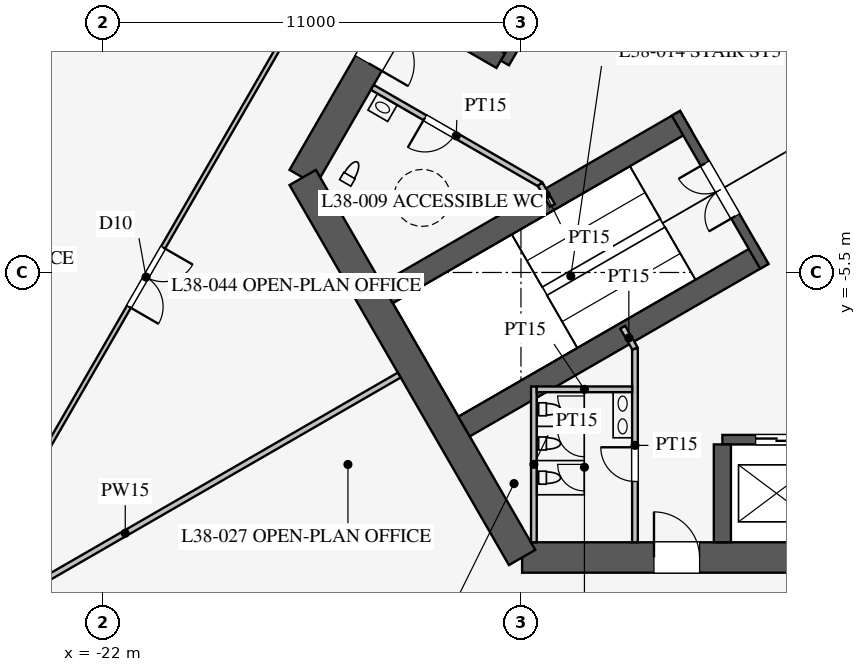
"""IFC4 building model, lengths in metres.
Left out: names, types, materials, properties, quantities, classifications, styles, units other than length and angle.
Written with IfcOpenShell. Run it as: python <this file> out.ifc"""

import sys

from ifc_helpers import new_model, si_unit, direction, frame, frame_2d, origin, place, context, subcontext, project, spatial, rectangle, extrude, element, fill, save


model = new_model("IFC4")
c1 = context("Model", 3, precision=1e-05, world=origin(), true_north=direction((0.0, 1.0)))
c2 = subcontext(c1, "Body", "Model", "MODEL_VIEW")
j1 = project(units=[si_unit("LENGTHUNIT", "METRE"), si_unit("PLANEANGLEUNIT", "RADIAN")], contexts=[c1])
p1 = place(None, origin())
s1 = spatial("IfcSite", under=j1, at=p1, CompositionType="ELEMENT")
p2 = place(p1, origin())
s2 = spatial("IfcBuilding", under=s1, at=p2, CompositionType="ELEMENT")
p3 = place(p2, frame((0.0, 0.0, 166.1)))
s3 = spatial("IfcBuildingStorey", under=s2, at=p3, CompositionType="ELEMENT", Elevation=166.1)
p4 = place(p3, frame((-10.97, -13.0, 0.0), z_axis=(0.0, 0.0, 1.0), x_axis=(1.0, 0.0, 0.0)))
e1 = element("IfcWall", 1, at=p4, inside=s3, PredefinedType="SHEAR", context=c2, shape_type="SweptSolid", body=[
    extrude(rectangle(XDim=21.939, YDim=0.8, at=frame_2d((10.97, 0.0))), origin(), (0.0, 0.0, 1.0), 4.2),
])
p5 = place(p4, frame((17.27, 0.0, 0.0)))
e2 = element("IfcOpeningElement", 2, at=p5, cuts=e1, PredefinedType="OPENING", context=c2, shape_type="SweptSolid", body=[
    extrude(rectangle(XDim=1.2, YDim=2.1, at=frame_2d((0.6, 1.05))), frame((0.0, 0.41, 0.0), z_axis=(0.0, -1.0, 0.0), x_axis=(1.0, 0.0, 0.0)), (0.0, 0.0, 1.0), 0.82),
])
p6 = place(p4, frame((3.47, 0.0, 0.0)))
e3 = element("IfcOpeningElement", 3, at=p6, cuts=e1, PredefinedType="OPENING", context=c2, shape_type="SweptSolid", body=[
    extrude(rectangle(XDim=1.2, YDim=2.1, at=frame_2d((0.6, 1.05))), frame((0.0, 0.41, 0.0), z_axis=(0.0, -1.0, 0.0), x_axis=(1.0, 0.0, 0.0)), (0.0, 0.0, 1.0), 0.82),
])
p7 = place(p3, frame((-5.773, 16.0, 0.0), z_axis=(0.0, 0.0, 1.0), x_axis=(-0.500002442456, -0.866023993627, 0.0)))
e4 = element("IfcWall", 4, at=p7, inside=s3, PredefinedType="SHEAR", context=c2, shape_type="SweptSolid", body=[
    extrude(rectangle(XDim=21.939, YDim=0.8, at=frame_2d((10.97, 0.0))), origin(), (0.0, 0.0, 1.0), 4.2),
])
p8 = place(p7, frame((17.27, 0.0, 0.0)))
e5 = element("IfcOpeningElement", 5, at=p8, cuts=e4, PredefinedType="OPENING", context=c2, shape_type="SweptSolid", body=[
    extrude(rectangle(XDim=1.2, YDim=2.1, at=frame_2d((0.6, 1.05))), frame((0.0, 0.41, 0.0), z_axis=(0.0, -1.0, 0.0), x_axis=(1.0, 0.0, 0.0)), (0.0, 0.0, 1.0), 0.82),
])
p9 = place(p7, frame((3.47, 0.0, 0.0)))
e6 = element("IfcOpeningElement", 6, at=p9, cuts=e4, PredefinedType="OPENING", context=c2, shape_type="SweptSolid", body=[
    extrude(rectangle(XDim=1.2, YDim=2.1, at=frame_2d((0.6, 1.05))), frame((0.0, 0.41, 0.0), z_axis=(0.0, -1.0, 0.0), x_axis=(1.0, 0.0, 0.0)), (0.0, 0.0, 1.0), 0.82),
])
p10 = place(p3, frame((-16.743, -3.0, 0.0), z_axis=(0.0, 0.0, 1.0), x_axis=(0.499995765644, -0.866027848477, 0.0)))
e7 = element("IfcWall", 7, at=p10, inside=s3, PredefinedType="SHEAR", context=c2, shape_type="SweptSolid", body=[
    extrude(rectangle(XDim=11.547, YDim=0.8, at=frame_2d((5.773, 0.0))), origin(), (0.0, 0.0, 1.0), 4.2),
])
p11 = place(p3, frame((-5.7, -9.9, 0.0), z_axis=(0.0, 0.0, 1.0), x_axis=(1.0, 0.0, 0.0)))
e8 = element("IfcWall", 8, at=p11, inside=s3, PredefinedType="SHEAR", context=c2, shape_type="SweptSolid", body=[
    extrude(rectangle(XDim=11.4, YDim=0.25, at=frame_2d((5.7, 0.0))), origin(), (0.0, 0.0, 1.0), 4.2),
])
p12 = place(p11, frame((0.875, 0.0, 0.0)))
e9 = element("IfcOpeningElement", 9, at=p12, cuts=e8, PredefinedType="OPENING", context=c2, shape_type="SweptSolid", body=[
    extrude(rectangle(XDim=1.1, YDim=2.2, at=frame_2d((0.55, 1.1))), frame((0.0, 0.135, 0.0), z_axis=(0.0, -1.0, 0.0), x_axis=(1.0, 0.0, 0.0)), (0.0, 0.0, 1.0), 0.27),
])
p13 = place(p11, frame((3.725, 0.0, 0.0)))
e10 = element("IfcOpeningElement", 10, at=p13, cuts=e8, PredefinedType="OPENING", context=c2, shape_type="SweptSolid", body=[
    extrude(rectangle(XDim=1.1, YDim=2.2, at=frame_2d((0.55, 1.1))), frame((0.0, 0.135, 0.0), z_axis=(0.0, -1.0, 0.0), x_axis=(1.0, 0.0, 0.0)), (0.0, 0.0, 1.0), 0.27),
])
p14 = place(p11, frame((6.575, 0.0, 0.0)))
e11 = element("IfcOpeningElement", 11, at=p14, cuts=e8, PredefinedType="OPENING", context=c2, shape_type="SweptSolid", body=[
    extrude(rectangle(XDim=1.1, YDim=2.2, at=frame_2d((0.55, 1.1))), frame((0.0, 0.135, 0.0), z_axis=(0.0, -1.0, 0.0), x_axis=(1.0, 0.0, 0.0)), (0.0, 0.0, 1.0), 0.27),
])
p15 = place(p11, frame((9.425, 0.0, 0.0)))
e12 = element("IfcOpeningElement", 12, at=p15, cuts=e8, PredefinedType="OPENING", context=c2, shape_type="SweptSolid", body=[
    extrude(rectangle(XDim=1.1, YDim=2.2, at=frame_2d((0.55, 1.1))), frame((0.0, 0.135, 0.0), z_axis=(0.0, -1.0, 0.0), x_axis=(1.0, 0.0, 0.0)), (0.0, 0.0, 1.0), 0.27),
])
p16 = place(p3, frame((-5.7, -10.025, 0.0), z_axis=(0.0, 0.0, 1.0), x_axis=(0.0, -1.0, 0.0)))
e13 = element("IfcWall", 13, at=p16, inside=s3, PredefinedType="SHEAR", context=c2, shape_type="SweptSolid", body=[
    extrude(rectangle(XDim=2.575, YDim=0.45, at=frame_2d((1.288, 0.0))), origin(), (0.0, 0.0, 1.0), 4.2),
])
p17 = place(p3, frame((-5.724, 9.886, 0.0), z_axis=(0.0, 0.0, 1.0), x_axis=(-0.500001763848, -0.866024385424, 0.0)))
e14 = element("IfcWall", 14, at=p17, inside=s3, PredefinedType="SHEAR", context=c2, shape_type="SweptSolid", body=[
    extrude(rectangle(XDim=11.4, YDim=0.25, at=frame_2d((5.7, 0.0))), origin(), (0.0, 0.0, 1.0), 4.2),
])
p18 = place(p17, frame((6.525, 0.0, 0.0)))
e15 = element("IfcOpeningElement", 15, at=p18, cuts=e14, PredefinedType="OPENING", context=c2, shape_type="SweptSolid", body=[
    extrude(rectangle(XDim=1.2, YDim=2.2, at=frame_2d((0.6, 1.1))), frame((0.0, 0.135, 0.0), z_axis=(0.0, -1.0, 0.0), x_axis=(1.0, 0.0, 0.0)), (0.0, 0.0, 1.0), 0.27),
])
p19 = place(p17, frame((9.375, 0.0, 0.0)))
e16 = element("IfcOpeningElement", 16, at=p19, cuts=e14, PredefinedType="OPENING", context=c2, shape_type="SweptSolid", body=[
    extrude(rectangle(XDim=1.2, YDim=2.2, at=frame_2d((0.6, 1.1))), frame((0.0, 0.135, 0.0), z_axis=(0.0, -1.0, 0.0), x_axis=(1.0, 0.0, 0.0)), (0.0, 0.0, 1.0), 0.27),
])
p20 = place(p3, frame((-11.532, 0.076, 0.0), z_axis=(0.0, 0.0, 1.0), x_axis=(-0.866005588531, 0.500034319456, 0.0)))
e17 = element("IfcWall", 17, at=p20, inside=s3, PredefinedType="SHEAR", context=c2, shape_type="SweptSolid", body=[
    extrude(rectangle(XDim=2.575, YDim=0.45, at=frame_2d((1.288, 0.0))), origin(), (0.0, 0.0, 1.0), 4.2),
])
for number, where, z_axis, x_axis in (
    (18, (-6.663, -1.509, 0.0), (0.0, 0.0, 1.0), (-0.866, -0.5, 0.0)),
    (19, (-4.638, -5.016, 0.0), (0.0, 0.0, 1.0), (-0.866, -0.5, 0.0)),
):
    element("IfcWall", number, at=place(p3, frame(where, z_axis=z_axis, x_axis=x_axis)), inside=s3, PredefinedType="SHEAR", context=c2, shape_type="SweptSolid", body=[
        extrude(rectangle(XDim=9.075, YDim=0.6, at=frame_2d((4.538, 0.0))), origin(), (0.0, 0.0, 1.0), 4.2),
    ])
p21 = place(p3, frame((-6.922, -1.312, 0.0), z_axis=(0.0, 0.0, 1.0), x_axis=(0.499984536904, -0.866034331223, 0.0)))
e20 = element("IfcWall", 20, at=p21, inside=s3, PredefinedType="SHEAR", context=c2, shape_type="SweptSolid", body=[
    extrude(rectangle(XDim=4.65, YDim=0.25, at=frame_2d((2.325, 0.0))), origin(), (0.0, 0.0, 1.0), 4.2),
])
p22 = place(p21, frame((1.525, 0.0, 0.0)))
e21 = element("IfcOpeningElement", 21, at=p22, cuts=e20, PredefinedType="OPENING", context=c2, shape_type="SweptSolid", body=[
    extrude(rectangle(XDim=1.6, YDim=2.1, at=frame_2d((0.8, 1.05))), frame((0.0, 0.135, 0.0), z_axis=(0.0, -1.0, 0.0), x_axis=(1.0, 0.0, 0.0)), (0.0, 0.0, 1.0), 0.27),
])
p23 = place(p3, frame((-8.0, -7.5, 0.0), z_axis=(0.0, 0.0, 1.0), x_axis=(0.0, -1.0, 0.0)))
e22 = element("IfcWall", 22, at=p23, inside=s3, PredefinedType="PARTITIONING", context=c2, shape_type="SweptSolid", body=[
    extrude(rectangle(XDim=5.1, YDim=0.15, at=frame_2d((2.55, 0.0))), origin(), (0.0, 0.0, 1.0), 4.0),
])
p24 = place(p23, frame((2.6, 0.0, 0.0)))
e23 = element("IfcOpeningElement", 23, at=p24, cuts=e22, PredefinedType="OPENING", context=c2, shape_type="SweptSolid", body=[
    extrude(rectangle(XDim=0.9, YDim=2.1, at=frame_2d((0.45, 1.05))), frame((0.0, 0.085, 0.0), z_axis=(0.0, -1.0, 0.0), x_axis=(1.0, 0.0, 0.0)), (0.0, 0.0, 1.0), 0.17),
])
p25 = place(p3, frame((-10.495, -3.178, 0.0), z_axis=(0.0, 0.0, 1.0), x_axis=(-0.86602216432, 0.500005610874, 0.0)))
e24 = element("IfcWall", 24, at=p25, inside=s3, PredefinedType="PARTITIONING", context=c2, shape_type="SweptSolid", body=[
    extrude(rectangle(XDim=5.1, YDim=0.15, at=frame_2d((2.55, 0.0))), origin(), (0.0, 0.0, 1.0), 4.0),
])
p26 = place(p25, frame((2.6, 0.0, 0.0)))
e25 = element("IfcOpeningElement", 25, at=p26, cuts=e24, PredefinedType="OPENING", context=c2, shape_type="SweptSolid", body=[
    extrude(rectangle(XDim=0.9, YDim=2.1, at=frame_2d((0.45, 1.05))), frame((0.0, 0.085, 0.0), z_axis=(0.0, -1.0, 0.0), x_axis=(1.0, 0.0, 0.0)), (0.0, 0.0, 1.0), 0.17),
])
for number, where, z_axis, x_axis in (
    (26, (-10.495, -3.178, 0.0), (0.0, 0.0, 1.0), (0.5, -0.866, 0.0)),
    (27, (-8.0, -7.5, 0.0), (0.0, 0.0, 1.0), (-0.5, 0.866, 0.0)),
):
    element("IfcWall", number, at=place(p3, frame(where, z_axis=z_axis, x_axis=x_axis)), inside=s3, PredefinedType="PARTITIONING", context=c2, shape_type="SweptSolid", body=[
        extrude(rectangle(XDim=0.645, YDim=0.15, at=frame_2d((0.323, 0.0))), origin(), (0.0, 0.0, 1.0), 4.0),
    ])
p27 = place(p3, frame((-10.66, -8.5, 0.0), z_axis=(0.0, 0.0, 1.0), x_axis=(0.0, -1.0, 0.0)))
e28 = element("IfcWall", 28, at=p27, inside=s3, PredefinedType="PARTITIONING", context=c2, shape_type="SweptSolid", body=[
    extrude(rectangle(XDim=4.1, YDim=0.15, at=frame_2d((2.05, 0.0))), origin(), (0.0, 0.0, 1.0), 4.0),
])
p28 = place(p3, frame((-8.075, -8.575, 0.0), z_axis=(0.0, 0.0, 1.0), x_axis=(-1.0, 0.0, 0.0)))
e29 = element("IfcWall", 29, at=p28, inside=s3, PredefinedType="PARTITIONING", context=c2, shape_type="SweptSolid", body=[
    extrude(rectangle(XDim=2.51, YDim=0.15, at=frame_2d((1.255, 0.0))), origin(), (0.0, 0.0, 1.0), 4.0),
])
p29 = place(p3, frame((-14.203, -8.2, 0.0), z_axis=(0.0, 0.0, 1.0), x_axis=(-0.866024668836, -0.500001272966, 0.0)))
e30 = element("IfcWall", 30, at=p29, inside=s3, PredefinedType="PARTITIONING", context=c2, shape_type="SweptSolid", body=[
    extrude(rectangle(XDim=16.65, YDim=0.15, at=frame_2d((8.325, 0.0))), origin(), (0.0, 0.0, 1.0), 2.3),
])
p30 = place(p3, frame((-0.016, 30.491, 0.0), z_axis=(0.0, 0.0, 1.0), x_axis=(-0.50000091641, -0.866024874695, 0.0)))
e31 = element("IfcWall", 31, at=p30, inside=s3, PredefinedType="PARTITIONING", context=c2, shape_type="SweptSolid", body=[
    extrude(rectangle(XDim=52.796, YDim=0.12, at=frame_2d((26.398, 0.0))), origin(), (0.0, 0.0, 1.0), 2.9),
])
p31 = place(p30, frame((10.2, 0.0, 0.15)))
e32 = element("IfcOpeningElement", 32, at=p31, cuts=e31, PredefinedType="OPENING", context=c2, shape_type="SweptSolid", body=[
    extrude(rectangle(XDim=1.8, YDim=2.1, at=frame_2d((0.9, 1.05))), frame((0.0, 0.07, 0.0), z_axis=(0.0, -1.0, 0.0), x_axis=(1.0, 0.0, 0.0)), (0.0, 0.0, 1.0), 0.14),
])
p32 = place(p30, frame((40.8, 0.0, 0.15)))
e33 = element("IfcOpeningElement", 33, at=p32, cuts=e31, PredefinedType="OPENING", context=c2, shape_type="SweptSolid", body=[
    extrude(rectangle(XDim=1.8, YDim=2.1, at=frame_2d((0.9, 1.05))), frame((0.0, 0.07, 0.0), z_axis=(0.0, -1.0, 0.0), x_axis=(1.0, 0.0, 0.0)), (0.0, 0.0, 1.0), 0.14),
])
p33 = place(p24, frame((0.9, 0.0, 0.0), z_axis=(0.0, 0.0, 1.0), x_axis=(-1.0, 0.0, 0.0)))
e34 = element("IfcDoor", 34, at=p33, inside=s3, OperationType="SINGLE_SWING_RIGHT", PredefinedType="DOOR", context=c2, shape_type="SweptSolid", body=[
    extrude(rectangle(XDim=0.9, YDim=2.1, at=frame_2d((0.45, 1.05))), frame((0.0, 0.025, 0.0), z_axis=(0.0, -1.0, 0.0), x_axis=(1.0, 0.0, 0.0)), (0.0, 0.0, 1.0), 0.05),
])
fill(e23, e34)
p34 = place(p26, origin())
e35 = element("IfcDoor", 35, at=p34, inside=s3, OperationType="SINGLE_SWING_RIGHT", PredefinedType="DOOR", context=c2, shape_type="SweptSolid", body=[
    extrude(rectangle(XDim=0.9, YDim=2.1, at=frame_2d((0.45, 1.05))), frame((0.0, 0.025, 0.0), z_axis=(0.0, -1.0, 0.0), x_axis=(1.0, 0.0, 0.0)), (0.0, 0.0, 1.0), 0.05),
])
fill(e25, e35)
p35 = place(p22, frame((1.6, 0.0, 0.0), z_axis=(0.0, 0.0, 1.0), x_axis=(-1.0, 0.0, 0.0)))
e36 = element("IfcDoor", 36, at=p35, inside=s3, OperationType="DOUBLE_DOOR_SINGLE_SWING", PredefinedType="DOOR", context=c2, shape_type="SweptSolid", body=[
    extrude(rectangle(XDim=1.6, YDim=2.1, at=frame_2d((0.8, 1.05))), frame((0.0, 0.025, 0.0), z_axis=(0.0, -1.0, 0.0), x_axis=(1.0, 0.0, 0.0)), (0.0, 0.0, 1.0), 0.05),
])
fill(e21, e36)
p36 = place(p6, origin())
e37 = element("IfcDoor", 37, at=p36, inside=s3, OperationType="SINGLE_SWING_LEFT", PredefinedType="DOOR", context=c2, shape_type="SweptSolid", body=[
    extrude(rectangle(XDim=1.2, YDim=2.1, at=frame_2d((0.6, 1.05))), frame((0.0, 0.025, 0.0), z_axis=(0.0, -1.0, 0.0), x_axis=(1.0, 0.0, 0.0)), (0.0, 0.0, 1.0), 0.05),
])
fill(e3, e37)
p37 = place(p8, origin())
e38 = element("IfcDoor", 38, at=p37, inside=s3, OperationType="SINGLE_SWING_RIGHT", PredefinedType="DOOR", context=c2, shape_type="SweptSolid", body=[
    extrude(rectangle(XDim=1.2, YDim=2.1, at=frame_2d((0.6, 1.05))), frame((0.0, 0.025, 0.0), z_axis=(0.0, -1.0, 0.0), x_axis=(1.0, 0.0, 0.0)), (0.0, 0.0, 1.0), 0.05),
])
fill(e5, e38)
p38 = place(p32, origin())
e39 = element("IfcDoor", 39, at=p38, inside=s3, OperationType="DOUBLE_DOOR_SINGLE_SWING", PredefinedType="DOOR", context=c2, shape_type="SweptSolid", body=[
    extrude(rectangle(XDim=1.8, YDim=2.1, at=frame_2d((0.9, 1.05))), frame((0.0, 0.025, 0.0), z_axis=(0.0, -1.0, 0.0), x_axis=(1.0, 0.0, 0.0)), (0.0, 0.0, 1.0), 0.05),
])
fill(e33, e39)
p39 = place(p12, origin())
e40 = element("IfcDoor", 40, at=p39, inside=s3, OperationType="DOUBLE_DOOR_SLIDING", PredefinedType="DOOR", context=c2, shape_type="SweptSolid", body=[
    extrude(rectangle(XDim=1.1, YDim=2.2, at=frame_2d((0.55, 1.1))), frame((0.0, 0.025, 0.0), z_axis=(0.0, -1.0, 0.0), x_axis=(1.0, 0.0, 0.0)), (0.0, 0.0, 1.0), 0.05),
])
fill(e9, e40)
save(model, sys.argv[1])
